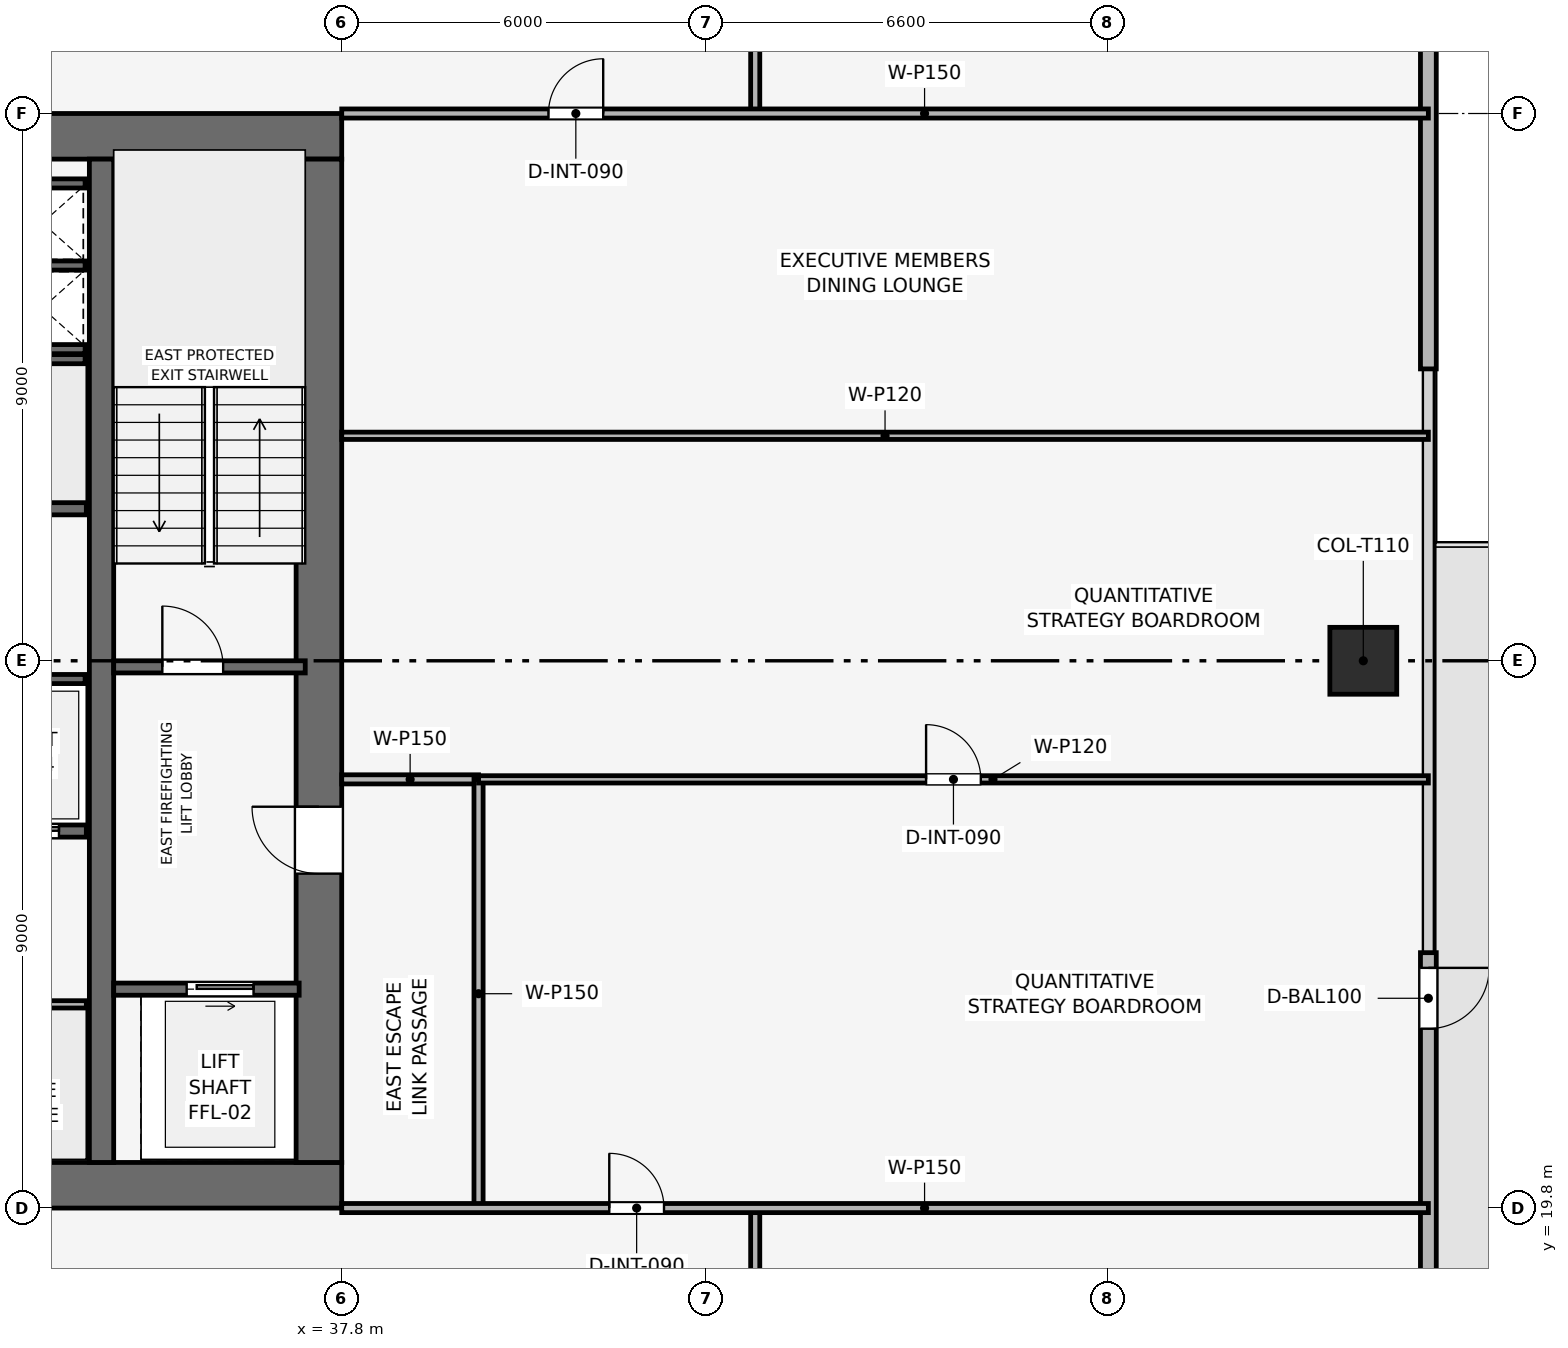
"""IFC4 building model, lengths in metres.
Left out: names, types, materials, properties, quantities, classifications, styles, units other than length and angle.
Written with IfcOpenShell. Run it as: python <this file> out.ifc"""

import sys

from ifc_helpers import new_model, si_unit, direction, frame, frame_2d, origin, origin_2d, place, context, subcontext, project, spatial, rectangle, extrude, element, fill, save


model = new_model("IFC4")
c1 = context("Model", 3, precision=1e-05, world=origin(), true_north=direction((0.0, 1.0)))
c2 = subcontext(c1, "Body", "Model", "MODEL_VIEW")
j1 = project(units=[si_unit("LENGTHUNIT", "METRE"), si_unit("PLANEANGLEUNIT", "RADIAN")], contexts=[c1])
p1 = place(None, origin())
s1 = spatial("IfcSite", under=j1, at=p1, CompositionType="ELEMENT")
p2 = place(p1, origin())
s2 = spatial("IfcBuilding", under=s1, at=p2, CompositionType="ELEMENT")
p3 = place(p2, frame((0.0, 0.0, 207.45)))
s3 = spatial("IfcBuildingStorey", under=s2, at=p3, CompositionType="ELEMENT", Elevation=207.45)
p4 = place(p3, frame((19.8, 20.175, 0.0), z_axis=(0.0, 0.0, 1.0), x_axis=(1.0, 0.0, 0.0)))
e1 = element("IfcWall", 1, at=p4, inside=s3, PredefinedType="SHEAR", context=c2, shape_type="SweptSolid", body=[
    extrude(rectangle(XDim=18.0, YDim=0.75, at=frame_2d((9.0, 0.0))), origin(), (0.0, 0.0, 1.0), 3.75),
])
p5 = place(p4, frame((8.4, 0.0, 0.0)))
e2 = element("IfcOpeningElement", 2, at=p5, cuts=e1, PredefinedType="OPENING", context=c2, shape_type="SweptSolid", body=[
    extrude(rectangle(XDim=1.2, YDim=2.2, at=frame_2d((0.6, 1.1))), frame((0.0, 0.385, 0.0), z_axis=(0.0, -1.0, 0.0), x_axis=(1.0, 0.0, 0.0)), (0.0, 0.0, 1.0), 0.77),
])
p6 = place(p3, frame((19.8, 37.425, 0.0), z_axis=(0.0, 0.0, 1.0), x_axis=(1.0, 0.0, 0.0)))
e3 = element("IfcWall", 3, at=p6, inside=s3, PredefinedType="SHEAR", context=c2, shape_type="SweptSolid", body=[
    extrude(rectangle(XDim=18.0, YDim=0.75, at=frame_2d((9.0, 0.0))), origin(), (0.0, 0.0, 1.0), 3.75),
])
p7 = place(p6, frame((7.05, 0.0, 0.0)))
e4 = element("IfcOpeningElement", 4, at=p7, cuts=e3, PredefinedType="OPENING", context=c2, shape_type="SweptSolid", body=[
    extrude(rectangle(XDim=1.1, YDim=2.15, at=frame_2d((0.55, 1.075))), frame((0.0, 0.385, 0.0), z_axis=(0.0, -1.0, 0.0), x_axis=(1.0, 0.0, 0.0)), (0.0, 0.0, 1.0), 0.77),
])
p8 = place(p3, frame((37.425, 20.55, 0.0), z_axis=(0.0, 0.0, 1.0), x_axis=(0.0, 1.0, 0.0)))
e5 = element("IfcWall", 5, at=p8, inside=s3, PredefinedType="SHEAR", context=c2, shape_type="SweptSolid", body=[
    extrude(rectangle(XDim=16.5, YDim=0.75, at=frame_2d((8.25, 0.0))), origin(), (0.0, 0.0, 1.0), 3.75),
])
p9 = place(p8, frame((4.75, 0.0, 0.0)))
e6 = element("IfcOpeningElement", 6, at=p9, cuts=e5, PredefinedType="OPENING", context=c2, shape_type="SweptSolid", body=[
    extrude(rectangle(XDim=1.1, YDim=2.15, at=frame_2d((0.55, 1.075))), frame((0.0, 0.385, 0.0), z_axis=(0.0, -1.0, 0.0), x_axis=(1.0, 0.0, 0.0)), (0.0, 0.0, 1.0), 0.77),
])
p10 = place(p3, frame((33.85, 20.55, 0.0), z_axis=(0.0, 0.0, 1.0), x_axis=(0.0, 1.0, 0.0)))
e7 = element("IfcWall", 7, at=p10, inside=s3, PredefinedType="SHEAR", context=c2, shape_type="SweptSolid", body=[
    extrude(rectangle(XDim=16.5, YDim=0.4, at=frame_2d((8.25, 0.0))), origin(), (0.0, 0.0, 1.0), 3.75),
])
p11 = place(p3, frame((54.6, 28.8, 0.003), z_axis=(0.0, 0.0, 1.0), x_axis=(1.0, 0.0, 0.0)))
e8 = element("IfcColumn", 8, at=p11, inside=s3, PredefinedType="COLUMN", context=c2, shape_type="SweptSolid", body=[
    extrude(rectangle(XDim=1.1, YDim=1.1, at=origin_2d()), origin(), (0.0, 0.0, 1.0), 3.494),
])
p12 = place(p3, frame((55.67, 48.3, 0.0), z_axis=(0.0, 0.0, 1.0), x_axis=(0.0, -1.0, 0.0)))
e9 = element("IfcWall", 9, at=p12, inside=s3, PredefinedType="SOLIDWALL", context=c2, shape_type="SweptSolid", body=[
    extrude(rectangle(XDim=14.7, YDim=0.26, at=frame_2d((7.35, 0.0))), origin(), (0.0, 0.0, 1.0), 3.5),
])
p13 = place(p12, frame((0.25, 0.0, 0.9)))
e10 = element("IfcOpeningElement", 10, at=p13, cuts=e9, PredefinedType="OPENING", context=c2, shape_type="SweptSolid", body=[
    extrude(rectangle(XDim=3.8, YDim=1.9, at=frame_2d((1.9, 0.95))), frame((0.0, 0.14, 0.0), z_axis=(0.0, -1.0, 0.0), x_axis=(1.0, 0.0, 0.0)), (0.0, 0.0, 1.0), 0.28),
])
p14 = place(p3, frame((55.67, 24.0, 0.0), z_axis=(0.0, 0.0, 1.0), x_axis=(0.0, -1.0, 0.0)))
e11 = element("IfcWall", 11, at=p14, inside=s3, PredefinedType="SOLIDWALL", context=c2, shape_type="SweptSolid", body=[
    extrude(rectangle(XDim=14.7, YDim=0.26, at=frame_2d((7.35, 0.0))), origin(), (0.0, 0.0, 1.0), 3.5),
])
p15 = place(p14, frame((0.25, 0.0, 0.0)))
e12 = element("IfcOpeningElement", 12, at=p15, cuts=e11, PredefinedType="OPENING", context=c2, shape_type="SweptSolid", body=[
    extrude(rectangle(XDim=1.0, YDim=2.2, at=frame_2d((0.5, 1.1))), frame((0.0, 0.14, 0.0), z_axis=(0.0, -1.0, 0.0), x_axis=(1.0, 0.0, 0.0)), (0.0, 0.0, 1.0), 0.28),
])
p16 = place(p3, frame((34.05, 28.7, 0.0), z_axis=(0.0, 0.0, 1.0), x_axis=(1.0, 0.0, 0.0)))
e13 = element("IfcWall", 13, at=p16, inside=s3, PredefinedType="SHEAR", context=c2, shape_type="SweptSolid", body=[
    extrude(rectangle(XDim=3.15, YDim=0.2, at=frame_2d((1.575, 0.0))), origin(), (0.0, 0.0, 1.0), 3.5),
])
p17 = place(p16, frame((0.8, 0.0, 0.0)))
e14 = element("IfcOpeningElement", 14, at=p17, cuts=e13, PredefinedType="OPENING", context=c2, shape_type="SweptSolid", body=[
    extrude(rectangle(XDim=1.0, YDim=2.1, at=frame_2d((0.5, 1.05))), frame((0.0, 0.11, 0.0), z_axis=(0.0, -1.0, 0.0), x_axis=(1.0, 0.0, 0.0)), (0.0, 0.0, 1.0), 0.22),
])
for number, where, z_axis, x_axis in (
    (15, (32.25, 33.925, 0.0), (0.0, 0.0, 1.0), (1.0, 0.0, 0.0)),
    (16, (32.25, 35.3, 0.0), (0.0, 0.0, 1.0), (1.0, 0.0, 0.0)),
):
    element("IfcWall", number, at=place(p3, frame(where, z_axis=z_axis, x_axis=x_axis)), inside=s3, PredefinedType="SHEAR", context=c2, shape_type="SweptSolid", body=[
        extrude(rectangle(XDim=1.33, YDim=0.15, at=frame_2d((0.665, 0.0))), origin(), (0.0, 0.0, 1.0), 3.5),
    ])
p18 = place(p3, frame((34.05, 23.4, 0.0), z_axis=(0.0, 0.0, 1.0), x_axis=(1.0, 0.0, 0.0)))
e17 = element("IfcWall", 17, at=p18, inside=s3, PredefinedType="SHEAR", context=c2, shape_type="SweptSolid", body=[
    extrude(rectangle(XDim=3.05, YDim=0.2, at=frame_2d((1.525, 0.0))), origin(), (0.0, 0.0, 1.0), 3.5),
])
p19 = place(p18, frame((1.2, 0.0, 0.0)))
e18 = element("IfcOpeningElement", 18, at=p19, cuts=e17, PredefinedType="OPENING", context=c2, shape_type="SweptSolid", body=[
    extrude(rectangle(XDim=1.1, YDim=2.15, at=frame_2d((0.55, 1.075))), frame((0.0, 0.11, 0.0), z_axis=(0.0, -1.0, 0.0), x_axis=(1.0, 0.0, 0.0)), (0.0, 0.0, 1.0), 0.22),
])
p20 = place(p3, frame((31.6, 26.0, 0.0), z_axis=(0.0, 0.0, 1.0), x_axis=(1.0, 0.0, 0.0)))
e19 = element("IfcWall", 19, at=p20, inside=s3, PredefinedType="SHEAR", context=c2, shape_type="SweptSolid", body=[
    extrude(rectangle(XDim=2.0, YDim=0.2, at=frame_2d((1.0, 0.0))), origin(), (0.0, 0.0, 1.0), 3.5),
])
p21 = place(p20, frame((0.45, 0.0, 0.0)))
e20 = element("IfcOpeningElement", 20, at=p21, cuts=e19, PredefinedType="OPENING", context=c2, shape_type="SweptSolid", body=[
    extrude(rectangle(XDim=1.1, YDim=2.15, at=frame_2d((0.55, 1.075))), frame((0.0, 0.11, 0.0), z_axis=(0.0, -1.0, 0.0), x_axis=(1.0, 0.0, 0.0)), (0.0, 0.0, 1.0), 0.22),
])
p22 = place(p3, frame((31.6, 31.3, 0.0), z_axis=(0.0, 0.0, 1.0), x_axis=(1.0, 0.0, 0.0)))
e21 = element("IfcWall", 21, at=p22, inside=s3, PredefinedType="SHEAR", context=c2, shape_type="SweptSolid", body=[
    extrude(rectangle(XDim=2.0, YDim=0.2, at=frame_2d((1.0, 0.0))), origin(), (0.0, 0.0, 1.0), 3.5),
])
p23 = place(p3, frame((32.25, 36.65, 0.0), z_axis=(0.0, 0.0, 1.0), x_axis=(1.0, 0.0, 0.0)))
e22 = element("IfcWall", 22, at=p23, inside=s3, PredefinedType="SHEAR", context=c2, shape_type="SweptSolid", body=[
    extrude(rectangle(XDim=1.33, YDim=0.15, at=frame_2d((0.665, 0.0))), origin(), (0.0, 0.0, 1.0), 3.5),
])
for number, where, z_axis, x_axis in (
    (23, (29.5, 28.5, 0.0), (0.0, 0.0, 1.0), (1.0, 0.0, 0.0)),
    (24, (29.5, 33.76, 0.0), (0.0, 0.0, 1.0), (1.0, 0.0, 0.0)),
):
    element("IfcWall", number, at=place(p3, frame(where, z_axis=z_axis, x_axis=x_axis)), inside=s3, PredefinedType="SHEAR", context=c2, shape_type="SweptSolid", body=[
        extrude(rectangle(XDim=4.08, YDim=0.15, at=frame_2d((2.04, 0.0))), origin(), (0.0, 0.0, 1.0), 3.5),
    ])
p24 = place(p3, frame((29.55, 23.15, 0.0), z_axis=(0.0, 0.0, 1.0), x_axis=(1.0, 0.0, 0.0)))
e25 = element("IfcWall", 25, at=p24, inside=s3, PredefinedType="PARTITIONING", context=c2, shape_type="SweptSolid", body=[
    extrude(rectangle(XDim=4.05, YDim=0.12, at=frame_2d((2.025, 0.0))), origin(), (0.0, 0.0, 1.0), 3.5),
])
p25 = place(p24, frame((1.575, 0.0, 0.0)))
e26 = element("IfcOpeningElement", 26, at=p25, cuts=e25, PredefinedType="OPENING", context=c2, shape_type="SweptSolid", body=[
    extrude(rectangle(XDim=0.9, YDim=2.1, at=frame_2d((0.45, 1.05))), frame((0.0, 0.07, 0.0), z_axis=(0.0, -1.0, 0.0), x_axis=(1.0, 0.0, 0.0)), (0.0, 0.0, 1.0), 0.14),
])
p26 = place(p3, frame((37.8, 26.85, 0.0), z_axis=(0.0, 0.0, 1.0), x_axis=(1.0, 0.0, 0.0)))
e27 = element("IfcWall", 27, at=p26, inside=s3, PredefinedType="PARTITIONING", context=c2, shape_type="SweptSolid", body=[
    extrude(rectangle(XDim=2.25, YDim=0.15, at=frame_2d((1.125, 0.0))), origin(), (0.0, 0.0, 1.0), 3.5),
])
p27 = place(p3, frame((40.05, 19.8, 0.0), z_axis=(0.0, 0.0, 1.0), x_axis=(0.0, 1.0, 0.0)))
e28 = element("IfcWall", 28, at=p27, inside=s3, PredefinedType="PARTITIONING", context=c2, shape_type="SweptSolid", body=[
    extrude(rectangle(XDim=7.05, YDim=0.15, at=frame_2d((3.525, 0.0))), origin(), (0.0, 0.0, 1.0), 3.035),
])
p28 = place(p3, frame((40.05, 26.85, 0.0), z_axis=(0.0, 0.0, 1.0), x_axis=(1.0, 0.0, 0.0)))
e29 = element("IfcWall", 29, at=p28, inside=s3, PredefinedType="PARTITIONING", context=c2, shape_type="SweptSolid", body=[
    extrude(rectangle(XDim=15.62, YDim=0.12, at=frame_2d((7.81, 0.0))), origin(), (0.0, 0.0, 1.0), 2.885),
])
p29 = place(p28, frame((7.36, 0.0, 0.0)))
e30 = element("IfcOpeningElement", 30, at=p29, cuts=e29, PredefinedType="OPENING", context=c2, shape_type="SweptSolid", body=[
    extrude(rectangle(XDim=0.9, YDim=2.1, at=frame_2d((0.45, 1.05))), frame((0.0, 0.07, 0.0), z_axis=(0.0, -1.0, 0.0), x_axis=(1.0, 0.0, 0.0)), (0.0, 0.0, 1.0), 0.14),
])
p30 = place(p3, frame((37.8, 32.5, 0.0), z_axis=(0.0, 0.0, 1.0), x_axis=(1.0, 0.0, 0.0)))
e31 = element("IfcWall", 31, at=p30, inside=s3, PredefinedType="PARTITIONING", context=c2, shape_type="SweptSolid", body=[
    extrude(rectangle(XDim=17.87, YDim=0.12, at=frame_2d((8.935, 0.0))), origin(), (0.0, 0.0, 1.0), 2.885),
])
p31 = place(p3, frame((44.6, 17.4, 0.0), z_axis=(0.0, 0.0, 1.0), x_axis=(0.0, 1.0, 0.0)))
e32 = element("IfcWall", 32, at=p31, inside=s3, PredefinedType="PARTITIONING", context=c2, shape_type="SweptSolid", body=[
    extrude(rectangle(XDim=2.4, YDim=0.15, at=frame_2d((1.2, 0.0))), origin(), (0.0, 0.0, 1.0), 3.5),
])
p32 = place(p3, frame((44.6, 37.8, 0.0), z_axis=(0.0, 0.0, 1.0), x_axis=(0.0, 1.0, 0.0)))
e33 = element("IfcWall", 33, at=p32, inside=s3, PredefinedType="PARTITIONING", context=c2, shape_type="SweptSolid", body=[
    extrude(rectangle(XDim=2.4, YDim=0.15, at=frame_2d((1.2, 0.0))), origin(), (0.0, 0.0, 1.0), 3.5),
])
p33 = place(p3, frame((37.8, 19.8, 0.0), z_axis=(0.0, 0.0, 1.0), x_axis=(1.0, 0.0, 0.0)))
e34 = element("IfcWall", 34, at=p33, inside=s3, PredefinedType="PARTITIONING", context=c2, shape_type="SweptSolid", body=[
    extrude(rectangle(XDim=17.87, YDim=0.15, at=frame_2d((8.935, 0.0))), origin(), (0.0, 0.0, 1.0), 2.885),
])
p34 = place(p33, frame((4.4, 0.0, 0.0)))
e35 = element("IfcOpeningElement", 35, at=p34, cuts=e34, PredefinedType="OPENING", context=c2, shape_type="SweptSolid", body=[
    extrude(rectangle(XDim=0.9, YDim=2.1, at=frame_2d((0.45, 1.05))), frame((0.0, 0.085, 0.0), z_axis=(0.0, -1.0, 0.0), x_axis=(1.0, 0.0, 0.0)), (0.0, 0.0, 1.0), 0.17),
])
p35 = place(p3, frame((37.8, 37.8, 0.0), z_axis=(0.0, 0.0, 1.0), x_axis=(1.0, 0.0, 0.0)))
e36 = element("IfcWall", 36, at=p35, inside=s3, PredefinedType="PARTITIONING", context=c2, shape_type="SweptSolid", body=[
    extrude(rectangle(XDim=17.87, YDim=0.15, at=frame_2d((8.935, 0.0))), origin(), (0.0, 0.0, 1.0), 2.885),
])
p36 = place(p35, frame((3.4, 0.0, 0.0)))
e37 = element("IfcOpeningElement", 37, at=p36, cuts=e36, PredefinedType="OPENING", context=c2, shape_type="SweptSolid", body=[
    extrude(rectangle(XDim=0.9, YDim=2.1, at=frame_2d((0.45, 1.05))), frame((0.0, 0.085, 0.0), z_axis=(0.0, -1.0, 0.0), x_axis=(1.0, 0.0, 0.0)), (0.0, 0.0, 1.0), 0.17),
])
p37 = place(p15, origin())
e38 = element("IfcDoor", 38, at=p37, inside=s3, OperationType="SINGLE_SWING_LEFT", PredefinedType="DOOR", context=c2, shape_type="SweptSolid", body=[
    extrude(rectangle(XDim=1.0, YDim=2.2, at=frame_2d((0.5, 1.1))), frame((0.0, 0.025, 0.0), z_axis=(0.0, -1.0, 0.0), x_axis=(1.0, 0.0, 0.0)), (0.0, 0.0, 1.0), 0.05),
])
fill(e12, e38)
p38 = place(p17, origin())
e39 = element("IfcDoor", 39, at=p38, inside=s3, OperationType="SINGLE_SWING_LEFT", PredefinedType="DOOR", context=c2, shape_type="SweptSolid", body=[
    extrude(rectangle(XDim=1.0, YDim=2.1, at=frame_2d((0.5, 1.05))), frame((0.0, 0.025, 0.0), z_axis=(0.0, -1.0, 0.0), x_axis=(1.0, 0.0, 0.0)), (0.0, 0.0, 1.0), 0.05),
])
fill(e14, e39)
p39 = place(p19, origin())
e40 = element("IfcDoor", 40, at=p39, inside=s3, OperationType="SLIDING_TO_RIGHT", PredefinedType="DOOR", context=c2, shape_type="SweptSolid", body=[
    extrude(rectangle(XDim=1.1, YDim=2.15, at=frame_2d((0.55, 1.075))), frame((0.0, 0.025, 0.0), z_axis=(0.0, -1.0, 0.0), x_axis=(1.0, 0.0, 0.0)), (0.0, 0.0, 1.0), 0.05),
])
fill(e18, e40)
p40 = place(p21, origin())
e41 = element("IfcDoor", 41, at=p40, inside=s3, OperationType="SLIDING_TO_RIGHT", PredefinedType="DOOR", context=c2, shape_type="SweptSolid", body=[
    extrude(rectangle(XDim=1.1, YDim=2.15, at=frame_2d((0.55, 1.075))), frame((0.0, 0.025, 0.0), z_axis=(0.0, -1.0, 0.0), x_axis=(1.0, 0.0, 0.0)), (0.0, 0.0, 1.0), 0.05),
])
fill(e20, e41)
p41 = place(p29, origin())
e42 = element("IfcDoor", 42, at=p41, inside=s3, OperationType="SINGLE_SWING_LEFT", PredefinedType="DOOR", context=c2, shape_type="SweptSolid", body=[
    extrude(rectangle(XDim=0.9, YDim=2.1, at=frame_2d((0.45, 1.05))), frame((0.0, 0.025, 0.0), z_axis=(0.0, -1.0, 0.0), x_axis=(1.0, 0.0, 0.0)), (0.0, 0.0, 1.0), 0.05),
])
fill(e30, e42)
p42 = place(p34, origin())
e43 = element("IfcDoor", 43, at=p42, inside=s3, OperationType="SINGLE_SWING_LEFT", PredefinedType="DOOR", context=c2, shape_type="SweptSolid", body=[
    extrude(rectangle(XDim=0.9, YDim=2.1, at=frame_2d((0.45, 1.05))), frame((0.0, 0.025, 0.0), z_axis=(0.0, -1.0, 0.0), x_axis=(1.0, 0.0, 0.0)), (0.0, 0.0, 1.0), 0.05),
])
fill(e35, e43)
p43 = place(p36, origin())
e44 = element("IfcDoor", 44, at=p43, inside=s3, OperationType="SINGLE_SWING_RIGHT", PredefinedType="DOOR", context=c2, shape_type="SweptSolid", body=[
    extrude(rectangle(XDim=0.9, YDim=2.1, at=frame_2d((0.45, 1.05))), frame((0.0, 0.025, 0.0), z_axis=(0.0, -1.0, 0.0), x_axis=(1.0, 0.0, 0.0)), (0.0, 0.0, 1.0), 0.05),
])
fill(e37, e44)
p44 = place(p9, origin())
e45 = element("IfcDoor", 45, at=p44, inside=s3, OperationType="SINGLE_SWING_RIGHT", PredefinedType="DOOR", context=c2, shape_type="SweptSolid", body=[
    extrude(rectangle(XDim=1.1, YDim=2.15, at=frame_2d((0.55, 1.075))), frame((0.0, 0.025, 0.0), z_axis=(0.0, -1.0, 0.0), x_axis=(1.0, 0.0, 0.0)), (0.0, 0.0, 1.0), 0.05),
])
fill(e6, e45)
save(model, sys.argv[1])
